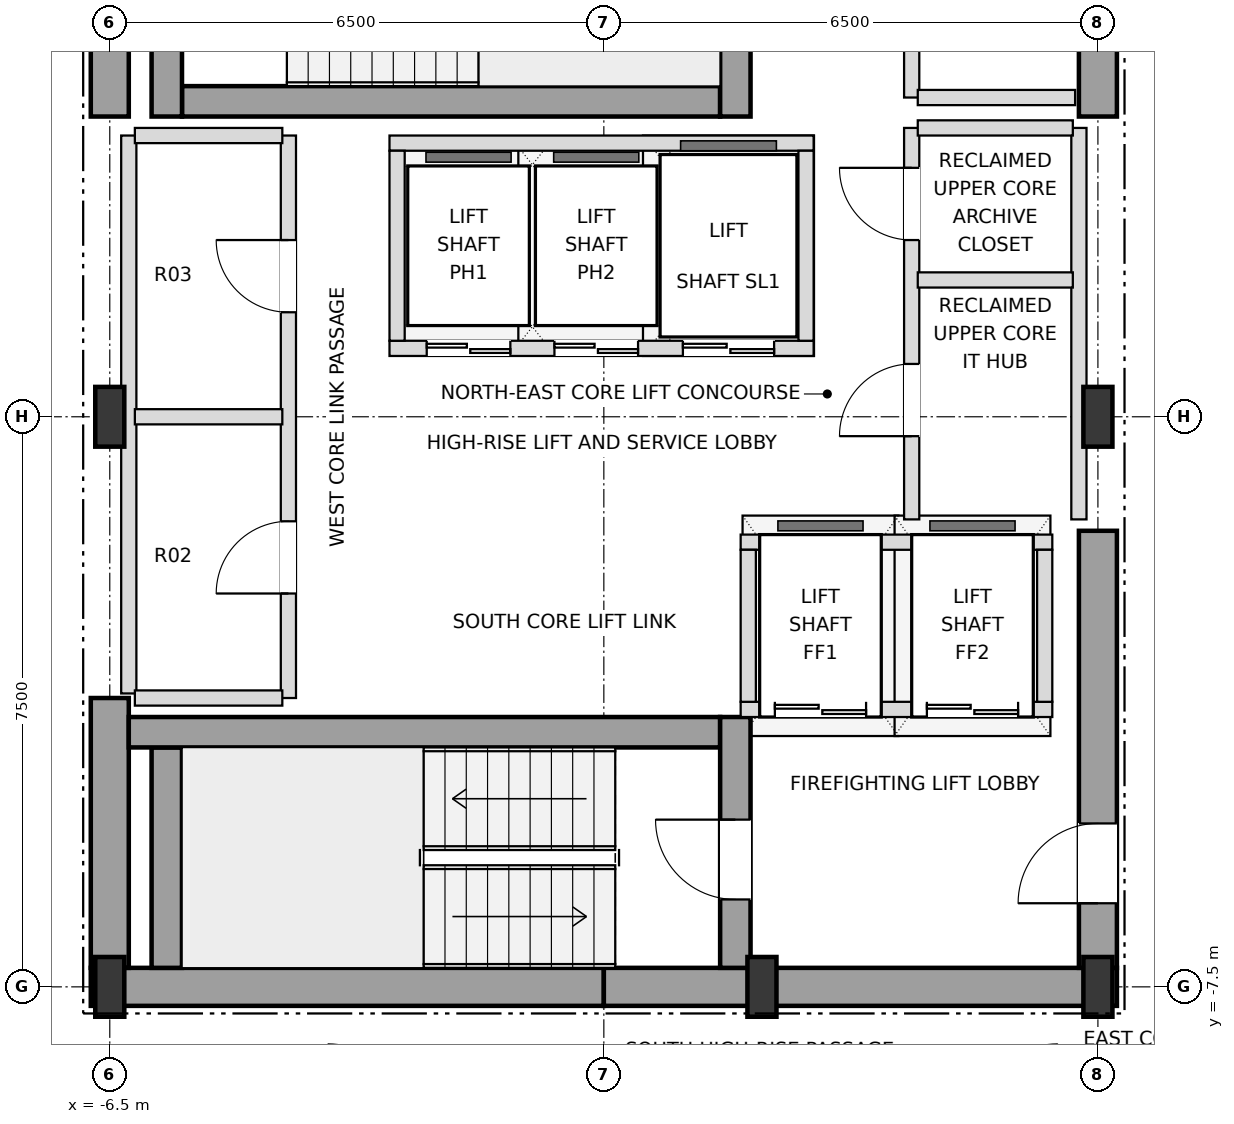
"""IFC4 building model, lengths in metres.
Left out: names, types, materials, properties, quantities, classifications, styles, units other than length and angle.
Written with IfcOpenShell. Run it as: python <this file> out.ifc"""

import sys

from ifc_helpers import new_model, si_unit, direction, frame, frame_2d, origin, origin_2d, place, context, subcontext, project, spatial, rectangle, i_section, extrude, element, fill, save


model = new_model("IFC4")
c1 = context("Model", 3, precision=1e-05, world=origin(), true_north=direction((0.0, 1.0)))
c2 = subcontext(c1, "Body", "Model", "MODEL_VIEW")
j1 = project(units=[si_unit("LENGTHUNIT", "METRE"), si_unit("PLANEANGLEUNIT", "RADIAN")], contexts=[c1])
p1 = place(None, origin())
s1 = spatial("IfcSite", under=j1, at=p1, CompositionType="ELEMENT")
p2 = place(p1, origin())
s2 = spatial("IfcBuilding", under=s1, at=p2, CompositionType="ELEMENT")
p3 = place(p2, frame((0.0, 0.0, 229.5)))
s3 = spatial("IfcBuildingStorey", under=s2, at=p3, CompositionType="ELEMENT", Elevation=229.5)
for number, where, z_axis, x_axis in (
    (1, (-6.5, -7.5, 0.0), (0.0, 0.0, 1.0), (1.0, 0.0, 0.0)),
    (2, (2.08, -7.5, 0.0), (0.0, 0.0, 1.0), (1.0, 0.0, 0.0)),
    (3, (6.5, -7.5, 0.0), (0.0, 0.0, 1.0), (1.0, 0.0, 0.0)),
    (4, (-6.5, 0.0, 0.0), (0.0, 0.0, 1.0), (1.0, 0.0, 0.0)),
    (5, (6.5, 0.0, 0.0), (0.0, 0.0, 1.0), (1.0, 0.0, 0.0)),
):
    element("IfcColumn", number, at=place(p3, frame(where, z_axis=z_axis, x_axis=x_axis)), inside=s3, PredefinedType="COLUMN", context=c2, shape_type="SweptSolid", body=[
        extrude(i_section(OverallWidth=0.382, OverallDepth=0.786, WebThickness=0.02, FlangeThickness=0.033, at=origin_2d()), origin(), (0.0, 0.0, 1.0), 3.6),
    ])
for number, where, z_axis, x_axis in (
    (6, (-6.75, -7.5, 0.0), (0.0, 0.0, 1.0), (1.0, 0.0, 0.0)),
    (7, (0.0, -7.5, 0.0), (0.0, 0.0, 1.0), (1.0, 0.0, 0.0)),
):
    element("IfcWall", number, at=place(p3, frame(where, z_axis=z_axis, x_axis=x_axis)), inside=s3, PredefinedType="SHEAR", context=c2, shape_type="SweptSolid", body=[
        extrude(rectangle(XDim=6.75, YDim=0.5, at=frame_2d((3.375, 0.0))), origin(), (0.0, 0.0, 1.0), 3.38),
    ])
p4 = place(p3, frame((-6.5, -7.25, 0.0), z_axis=(0.0, 0.0, 1.0), x_axis=(0.0, 1.0, 0.0)))
e8 = element("IfcWall", 8, at=p4, inside=s3, PredefinedType="SHEAR", context=c2, shape_type="SweptSolid", body=[
    extrude(rectangle(XDim=3.55, YDim=0.5, at=frame_2d((1.775, 0.0))), origin(), (0.0, 0.0, 1.0), 3.38),
])
p5 = place(p3, frame((-6.5, 3.95, 0.0), z_axis=(0.0, 0.0, 1.0), x_axis=(0.0, 1.0, 0.0)))
e9 = element("IfcWall", 9, at=p5, inside=s3, PredefinedType="SHEAR", context=c2, shape_type="SweptSolid", body=[
    extrude(rectangle(XDim=3.3, YDim=0.5, at=frame_2d((1.65, 0.0))), origin(), (0.0, 0.0, 1.0), 3.38),
])
p6 = place(p3, frame((6.5, -7.25, 0.0), z_axis=(0.0, 0.0, 1.0), x_axis=(0.0, 1.0, 0.0)))
e10 = element("IfcWall", 10, at=p6, inside=s3, PredefinedType="SHEAR", context=c2, shape_type="SweptSolid", body=[
    extrude(rectangle(XDim=5.75, YDim=0.5, at=frame_2d((2.875, 0.0))), origin(), (0.0, 0.0, 1.0), 3.38),
])
p7 = place(p6, frame((0.85, 0.0, 0.0)))
e11 = element("IfcOpeningElement", 11, at=p7, cuts=e10, PredefinedType="OPENING", context=c2, shape_type="SweptSolid", body=[
    extrude(rectangle(XDim=1.05, YDim=2.15, at=frame_2d((0.525, 1.075))), frame((0.0, 0.26, 0.0), z_axis=(0.0, -1.0, 0.0), x_axis=(1.0, 0.0, 0.0)), (0.0, 0.0, 1.0), 0.52),
])
p8 = place(p3, frame((6.5, 3.95, 0.0), z_axis=(0.0, 0.0, 1.0), x_axis=(0.0, 1.0, 0.0)))
e12 = element("IfcWall", 12, at=p8, inside=s3, PredefinedType="SHEAR", context=c2, shape_type="SweptSolid", body=[
    extrude(rectangle(XDim=3.3, YDim=0.5, at=frame_2d((1.65, 0.0))), origin(), (0.0, 0.0, 1.0), 3.38),
])
p9 = place(p3, frame((-5.75, -7.25, 0.0), z_axis=(0.0, 0.0, 1.0), x_axis=(0.0, 1.0, 0.0)))
e13 = element("IfcWall", 13, at=p9, inside=s3, PredefinedType="SHEAR", context=c2, shape_type="SweptSolid", body=[
    extrude(rectangle(XDim=2.9, YDim=0.4, at=frame_2d((1.45, 0.0))), origin(), (0.0, 0.0, 1.0), 3.38),
])
p10 = place(p3, frame((-6.25, -4.15, 0.0), z_axis=(0.0, 0.0, 1.0), x_axis=(1.0, 0.0, 0.0)))
e14 = element("IfcWall", 14, at=p10, inside=s3, PredefinedType="SHEAR", context=c2, shape_type="SweptSolid", body=[
    extrude(rectangle(XDim=7.78, YDim=0.4, at=frame_2d((3.89, 0.0))), origin(), (0.0, 0.0, 1.0), 3.38),
])
p11 = place(p3, frame((1.73, -7.25, 0.0), z_axis=(0.0, 0.0, 1.0), x_axis=(0.0, 1.0, 0.0)))
e15 = element("IfcWall", 15, at=p11, inside=s3, PredefinedType="SHEAR", context=c2, shape_type="SweptSolid", body=[
    extrude(rectangle(XDim=3.3, YDim=0.4, at=frame_2d((1.65, 0.0))), origin(), (0.0, 0.0, 1.0), 3.38),
])
p12 = place(p11, frame((0.9, 0.0, 0.0)))
e16 = element("IfcOpeningElement", 16, at=p12, cuts=e15, PredefinedType="OPENING", context=c2, shape_type="SweptSolid", body=[
    extrude(rectangle(XDim=1.05, YDim=2.15, at=frame_2d((0.525, 1.075))), frame((0.0, 0.21, 0.0), z_axis=(0.0, -1.0, 0.0), x_axis=(1.0, 0.0, 0.0)), (0.0, 0.0, 1.0), 0.42),
])
p13 = place(p3, frame((-5.55, 4.15, 0.0), z_axis=(0.0, 0.0, 1.0), x_axis=(1.0, 0.0, 0.0)))
e17 = element("IfcWall", 17, at=p13, inside=s3, PredefinedType="SHEAR", context=c2, shape_type="SweptSolid", body=[
    extrude(rectangle(XDim=7.08, YDim=0.4, at=frame_2d((3.54, 0.0))), origin(), (0.0, 0.0, 1.0), 3.38),
])
for number, where, z_axis, x_axis in (
    (18, (1.73, 3.95, 0.0), (0.0, 0.0, 1.0), (0.0, 1.0, 0.0)),
    (19, (-5.75, 3.95, 0.0), (0.0, 0.0, 1.0), (0.0, 1.0, 0.0)),
):
    element("IfcWall", number, at=place(p3, frame(where, z_axis=z_axis, x_axis=x_axis)), inside=s3, PredefinedType="SHEAR", context=c2, shape_type="SweptSolid", body=[
        extrude(rectangle(XDim=3.3, YDim=0.4, at=frame_2d((1.65, 0.0))), origin(), (0.0, 0.0, 1.0), 3.38),
    ])
p14 = place(p3, frame((-2.82, 0.9, 0.0), z_axis=(0.0, 0.0, 1.0), x_axis=(1.0, 0.0, 0.0)))
e20 = element("IfcWall", 20, at=p14, inside=s3, PredefinedType="SOLIDWALL", context=c2, shape_type="SweptSolid", body=[
    extrude(rectangle(XDim=5.58, YDim=0.2, at=frame_2d((2.79, 0.0))), origin(), (0.0, 0.0, 1.0), 3.38),
])
p15 = place(p14, frame((0.49, 0.0, 0.0)))
e21 = element("IfcOpeningElement", 21, at=p15, cuts=e20, PredefinedType="OPENING", context=c2, shape_type="SweptSolid", body=[
    extrude(rectangle(XDim=1.1, YDim=2.15, at=frame_2d((0.55, 1.075))), frame((0.0, 0.11, 0.0), z_axis=(0.0, -1.0, 0.0), x_axis=(1.0, 0.0, 0.0)), (0.0, 0.0, 1.0), 0.22),
])
p16 = place(p14, frame((2.17, 0.0, 0.0)))
e22 = element("IfcOpeningElement", 22, at=p16, cuts=e20, PredefinedType="OPENING", context=c2, shape_type="SweptSolid", body=[
    extrude(rectangle(XDim=1.1, YDim=2.15, at=frame_2d((0.55, 1.075))), frame((0.0, 0.11, 0.0), z_axis=(0.0, -1.0, 0.0), x_axis=(1.0, 0.0, 0.0)), (0.0, 0.0, 1.0), 0.22),
])
p17 = place(p14, frame((3.86, 0.0, 0.0)))
e23 = element("IfcOpeningElement", 23, at=p17, cuts=e20, PredefinedType="OPENING", context=c2, shape_type="SweptSolid", body=[
    extrude(rectangle(XDim=1.2, YDim=2.2, at=frame_2d((0.6, 1.1))), frame((0.0, 0.11, 0.0), z_axis=(0.0, -1.0, 0.0), x_axis=(1.0, 0.0, 0.0)), (0.0, 0.0, 1.0), 0.22),
])
p18 = place(p3, frame((-2.82, 3.6, 0.0), z_axis=(0.0, 0.0, 1.0), x_axis=(1.0, 0.0, 0.0)))
e24 = element("IfcWall", 24, at=p18, inside=s3, PredefinedType="SOLIDWALL", context=c2, shape_type="SweptSolid", body=[
    extrude(rectangle(XDim=5.58, YDim=0.2, at=frame_2d((2.79, 0.0))), origin(), (0.0, 0.0, 1.0), 3.38),
])
for number, where, z_axis, x_axis in (
    (25, (-2.72, 1.0, 0.0), (0.0, 0.0, 1.0), (0.0, 1.0, 0.0)),
    (26, (2.66, 1.0, 0.0), (0.0, 0.0, 1.0), (0.0, 1.0, 0.0)),
):
    element("IfcWall", number, at=place(p3, frame(where, z_axis=z_axis, x_axis=x_axis)), inside=s3, PredefinedType="SOLIDWALL", context=c2, shape_type="SweptSolid", body=[
        extrude(rectangle(XDim=2.5, YDim=0.2, at=frame_2d((1.25, 0.0))), origin(), (0.0, 0.0, 1.0), 3.38),
    ])
p19 = place(p3, frame((1.8, -3.85, 0.0), z_axis=(0.0, 0.0, 1.0), x_axis=(1.0, 0.0, 0.0)))
e27 = element("IfcWall", 27, at=p19, inside=s3, PredefinedType="SOLIDWALL", context=c2, shape_type="SweptSolid", body=[
    extrude(rectangle(XDim=4.1, YDim=0.2, at=frame_2d((2.05, 0.0))), origin(), (0.0, 0.0, 1.0), 3.38),
])
p20 = place(p19, frame((0.45, 0.0, 0.0)))
e28 = element("IfcOpeningElement", 28, at=p20, cuts=e27, PredefinedType="OPENING", context=c2, shape_type="SweptSolid", body=[
    extrude(rectangle(XDim=1.2, YDim=2.2, at=frame_2d((0.6, 1.1))), frame((0.0, 0.11, 0.0), z_axis=(0.0, -1.0, 0.0), x_axis=(1.0, 0.0, 0.0)), (0.0, 0.0, 1.0), 0.22),
])
p21 = place(p19, frame((2.45, 0.0, 0.0)))
e29 = element("IfcOpeningElement", 29, at=p21, cuts=e27, PredefinedType="OPENING", context=c2, shape_type="SweptSolid", body=[
    extrude(rectangle(XDim=1.2, YDim=2.2, at=frame_2d((0.6, 1.1))), frame((0.0, 0.11, 0.0), z_axis=(0.0, -1.0, 0.0), x_axis=(1.0, 0.0, 0.0)), (0.0, 0.0, 1.0), 0.22),
])
p22 = place(p3, frame((1.8, -1.65, 0.0), z_axis=(0.0, 0.0, 1.0), x_axis=(1.0, 0.0, 0.0)))
e30 = element("IfcWall", 30, at=p22, inside=s3, PredefinedType="SOLIDWALL", context=c2, shape_type="SweptSolid", body=[
    extrude(rectangle(XDim=4.1, YDim=0.2, at=frame_2d((2.05, 0.0))), origin(), (0.0, 0.0, 1.0), 3.38),
])
for number, where, z_axis, x_axis in (
    (31, (1.9, -3.75, 0.0), (0.0, 0.0, 1.0), (0.0, 1.0, 0.0)),
    (32, (5.8, -3.75, 0.0), (0.0, 0.0, 1.0), (0.0, 1.0, 0.0)),
):
    element("IfcWall", number, at=place(p3, frame(where, z_axis=z_axis, x_axis=x_axis)), inside=s3, PredefinedType="SOLIDWALL", context=c2, shape_type="SweptSolid", body=[
        extrude(rectangle(XDim=2.0, YDim=0.2, at=frame_2d((1.0, 0.0))), origin(), (0.0, 0.0, 1.0), 3.38),
    ])
p23 = place(p3, frame((-6.25, -3.64, 0.0), z_axis=(0.0, 0.0, 1.0), x_axis=(0.0, 1.0, 0.0)))
e33 = element("IfcWall", 33, at=p23, inside=s3, PredefinedType="SOLIDWALL", context=c2, shape_type="SweptSolid", body=[
    extrude(rectangle(XDim=7.34, YDim=0.2, at=frame_2d((3.67, 0.0))), origin(), (0.0, 0.0, 1.0), 3.38),
])
p24 = place(p3, frame((-4.15, -3.7, 0.0), z_axis=(0.0, 0.0, 1.0), x_axis=(0.0, 1.0, 0.0)))
e34 = element("IfcWall", 34, at=p24, inside=s3, PredefinedType="SOLIDWALL", context=c2, shape_type="SweptSolid", body=[
    extrude(rectangle(XDim=7.4, YDim=0.2, at=frame_2d((3.7, 0.0))), origin(), (0.0, 0.0, 1.0), 3.38),
])
p25 = place(p24, frame((1.375, 0.0, 0.0)))
e35 = element("IfcOpeningElement", 35, at=p25, cuts=e34, PredefinedType="OPENING", context=c2, shape_type="SweptSolid", body=[
    extrude(rectangle(XDim=0.95, YDim=2.15, at=frame_2d((0.475, 1.075))), frame((0.0, 0.11, 0.0), z_axis=(0.0, -1.0, 0.0), x_axis=(1.0, 0.0, 0.0)), (0.0, 0.0, 1.0), 0.22),
])
p26 = place(p24, frame((5.075, 0.0, 0.0)))
e36 = element("IfcOpeningElement", 36, at=p26, cuts=e34, PredefinedType="OPENING", context=c2, shape_type="SweptSolid", body=[
    extrude(rectangle(XDim=0.95, YDim=2.15, at=frame_2d((0.475, 1.075))), frame((0.0, 0.11, 0.0), z_axis=(0.0, -1.0, 0.0), x_axis=(1.0, 0.0, 0.0)), (0.0, 0.0, 1.0), 0.22),
])
p27 = place(p3, frame((4.05, -1.35, 0.0), z_axis=(0.0, 0.0, 1.0), x_axis=(0.0, 1.0, 0.0)))
e37 = element("IfcWall", 37, at=p27, inside=s3, PredefinedType="SOLIDWALL", context=c2, shape_type="SweptSolid", body=[
    extrude(rectangle(XDim=5.15, YDim=0.2, at=frame_2d((2.575, 0.0))), origin(), (0.0, 0.0, 1.0), 3.38),
])
p28 = place(p27, frame((1.095, 0.0, 0.0)))
e38 = element("IfcOpeningElement", 38, at=p28, cuts=e37, PredefinedType="OPENING", context=c2, shape_type="SweptSolid", body=[
    extrude(rectangle(XDim=0.95, YDim=2.15, at=frame_2d((0.475, 1.075))), frame((0.0, 0.11, 0.0), z_axis=(0.0, -1.0, 0.0), x_axis=(1.0, 0.0, 0.0)), (0.0, 0.0, 1.0), 0.22),
])
p29 = place(p27, frame((3.675, 0.0, 0.0)))
e39 = element("IfcOpeningElement", 39, at=p29, cuts=e37, PredefinedType="OPENING", context=c2, shape_type="SweptSolid", body=[
    extrude(rectangle(XDim=0.95, YDim=2.15, at=frame_2d((0.475, 1.075))), frame((0.0, 0.11, 0.0), z_axis=(0.0, -1.0, 0.0), x_axis=(1.0, 0.0, 0.0)), (0.0, 0.0, 1.0), 0.22),
])
p30 = place(p3, frame((4.05, 4.2, 0.0), z_axis=(0.0, 0.0, 1.0), x_axis=(0.0, 1.0, 0.0)))
e40 = element("IfcWall", 40, at=p30, inside=s3, PredefinedType="SOLIDWALL", context=c2, shape_type="SweptSolid", body=[
    extrude(rectangle(XDim=3.05, YDim=0.2, at=frame_2d((1.525, 0.0))), origin(), (0.0, 0.0, 1.0), 3.38),
])
p31 = place(p30, frame((0.975, 0.0, 0.0)))
e41 = element("IfcOpeningElement", 41, at=p31, cuts=e40, PredefinedType="OPENING", context=c2, shape_type="SweptSolid", body=[
    extrude(rectangle(XDim=0.95, YDim=2.15, at=frame_2d((0.475, 1.075))), frame((0.0, 0.11, 0.0), z_axis=(0.0, -1.0, 0.0), x_axis=(1.0, 0.0, 0.0)), (0.0, 0.0, 1.0), 0.22),
])
p32 = place(p3, frame((6.25, -1.35, 0.0), z_axis=(0.0, 0.0, 1.0), x_axis=(0.0, 1.0, 0.0)))
e42 = element("IfcWall", 42, at=p32, inside=s3, PredefinedType="SOLIDWALL", context=c2, shape_type="SweptSolid", body=[
    extrude(rectangle(XDim=5.15, YDim=0.2, at=frame_2d((2.575, 0.0))), origin(), (0.0, 0.0, 1.0), 3.38),
])
for number, where, z_axis, x_axis in (
    (43, (-6.17, -3.7, 0.0), (0.0, 0.0, 1.0), (1.0, 0.0, 0.0)),
    (44, (-6.17, 0.0, 0.0), (0.0, 0.0, 1.0), (1.0, 0.0, 0.0)),
):
    element("IfcWall", number, at=place(p3, frame(where, z_axis=z_axis, x_axis=x_axis)), inside=s3, PredefinedType="SOLIDWALL", context=c2, shape_type="SweptSolid", body=[
        extrude(rectangle(XDim=1.94, YDim=0.2, at=frame_2d((0.97, 0.0))), origin(), (0.0, 0.0, 1.0), 3.38),
    ])
p33 = place(p3, frame((4.13, 1.8, 0.0), z_axis=(0.0, 0.0, 1.0), x_axis=(1.0, 0.0, 0.0)))
e45 = element("IfcWall", 45, at=p33, inside=s3, PredefinedType="SOLIDWALL", context=c2, shape_type="SweptSolid", body=[
    extrude(rectangle(XDim=2.04, YDim=0.2, at=frame_2d((1.02, 0.0))), origin(), (0.0, 0.0, 1.0), 3.38),
])
p34 = place(p3, frame((-6.17, 3.7, 0.0), z_axis=(0.0, 0.0, 1.0), x_axis=(1.0, 0.0, 0.0)))
e46 = element("IfcWall", 46, at=p34, inside=s3, PredefinedType="SOLIDWALL", context=c2, shape_type="SweptSolid", body=[
    extrude(rectangle(XDim=1.94, YDim=0.2, at=frame_2d((0.97, 0.0))), origin(), (0.0, 0.0, 1.0), 3.38),
])
p35 = place(p3, frame((4.13, 3.8, 0.0), z_axis=(0.0, 0.0, 1.0), x_axis=(1.0, 0.0, 0.0)))
e47 = element("IfcWall", 47, at=p35, inside=s3, PredefinedType="SOLIDWALL", context=c2, shape_type="SweptSolid", body=[
    extrude(rectangle(XDim=2.04, YDim=0.2, at=frame_2d((1.02, 0.0))), origin(), (0.0, 0.0, 1.0), 3.38),
])
p36 = place(p3, frame((4.13, 4.2, 0.0), z_axis=(0.0, 0.0, 1.0), x_axis=(1.0, 0.0, 0.0)))
e48 = element("IfcWall", 48, at=p36, inside=s3, PredefinedType="SOLIDWALL", context=c2, shape_type="SweptSolid", body=[
    extrude(rectangle(XDim=2.07, YDim=0.2, at=frame_2d((1.035, 0.0))), origin(), (0.0, 0.0, 1.0), 3.38),
])
p37 = place(p7, origin())
e49 = element("IfcDoor", 49, at=p37, inside=s3, OperationType="SINGLE_SWING_LEFT", PredefinedType="DOOR", context=c2, shape_type="SweptSolid", body=[
    extrude(rectangle(XDim=1.05, YDim=2.15, at=frame_2d((0.525, 1.075))), frame((0.0, 0.025, 0.0), z_axis=(0.0, -1.0, 0.0), x_axis=(1.0, 0.0, 0.0)), (0.0, 0.0, 1.0), 0.05),
])
fill(e11, e49)
p38 = place(p12, origin())
e50 = element("IfcDoor", 50, at=p38, inside=s3, OperationType="SINGLE_SWING_RIGHT", PredefinedType="DOOR", context=c2, shape_type="SweptSolid", body=[
    extrude(rectangle(XDim=1.05, YDim=2.15, at=frame_2d((0.525, 1.075))), frame((0.0, 0.025, 0.0), z_axis=(0.0, -1.0, 0.0), x_axis=(1.0, 0.0, 0.0)), (0.0, 0.0, 1.0), 0.05),
])
fill(e16, e50)
p39 = place(p15, origin())
e51 = element("IfcDoor", 51, at=p39, inside=s3, OperationType="DOUBLE_DOOR_SLIDING", PredefinedType="DOOR", context=c2, shape_type="SweptSolid", body=[
    extrude(rectangle(XDim=1.1, YDim=2.15, at=frame_2d((0.55, 1.075))), frame((0.0, 0.025, 0.0), z_axis=(0.0, -1.0, 0.0), x_axis=(1.0, 0.0, 0.0)), (0.0, 0.0, 1.0), 0.05),
])
fill(e21, e51)
p40 = place(p16, origin())
e52 = element("IfcDoor", 52, at=p40, inside=s3, OperationType="DOUBLE_DOOR_SLIDING", PredefinedType="DOOR", context=c2, shape_type="SweptSolid", body=[
    extrude(rectangle(XDim=1.1, YDim=2.15, at=frame_2d((0.55, 1.075))), frame((0.0, 0.025, 0.0), z_axis=(0.0, -1.0, 0.0), x_axis=(1.0, 0.0, 0.0)), (0.0, 0.0, 1.0), 0.05),
])
fill(e22, e52)
p41 = place(p17, origin())
e53 = element("IfcDoor", 53, at=p41, inside=s3, OperationType="DOUBLE_DOOR_SLIDING", PredefinedType="DOOR", context=c2, shape_type="SweptSolid", body=[
    extrude(rectangle(XDim=1.2, YDim=2.2, at=frame_2d((0.6, 1.1))), frame((0.0, 0.025, 0.0), z_axis=(0.0, -1.0, 0.0), x_axis=(1.0, 0.0, 0.0)), (0.0, 0.0, 1.0), 0.05),
])
fill(e23, e53)
p42 = place(p20, origin())
e54 = element("IfcDoor", 54, at=p42, inside=s3, OperationType="DOUBLE_DOOR_SLIDING", PredefinedType="DOOR", context=c2, shape_type="SweptSolid", body=[
    extrude(rectangle(XDim=1.2, YDim=2.2, at=frame_2d((0.6, 1.1))), frame((0.0, 0.025, 0.0), z_axis=(0.0, -1.0, 0.0), x_axis=(1.0, 0.0, 0.0)), (0.0, 0.0, 1.0), 0.05),
])
fill(e28, e54)
p43 = place(p21, origin())
e55 = element("IfcDoor", 55, at=p43, inside=s3, OperationType="DOUBLE_DOOR_SLIDING", PredefinedType="DOOR", context=c2, shape_type="SweptSolid", body=[
    extrude(rectangle(XDim=1.2, YDim=2.2, at=frame_2d((0.6, 1.1))), frame((0.0, 0.025, 0.0), z_axis=(0.0, -1.0, 0.0), x_axis=(1.0, 0.0, 0.0)), (0.0, 0.0, 1.0), 0.05),
])
fill(e29, e55)
p44 = place(p25, origin())
e56 = element("IfcDoor", 56, at=p44, inside=s3, OperationType="SINGLE_SWING_LEFT", PredefinedType="DOOR", context=c2, shape_type="SweptSolid", body=[
    extrude(rectangle(XDim=0.95, YDim=2.15, at=frame_2d((0.475, 1.075))), frame((0.0, 0.025, 0.0), z_axis=(0.0, -1.0, 0.0), x_axis=(1.0, 0.0, 0.0)), (0.0, 0.0, 1.0), 0.05),
])
fill(e35, e56)
p45 = place(p26, origin())
e57 = element("IfcDoor", 57, at=p45, inside=s3, OperationType="SINGLE_SWING_RIGHT", PredefinedType="DOOR", context=c2, shape_type="SweptSolid", body=[
    extrude(rectangle(XDim=0.95, YDim=2.15, at=frame_2d((0.475, 1.075))), frame((0.0, 0.025, 0.0), z_axis=(0.0, -1.0, 0.0), x_axis=(1.0, 0.0, 0.0)), (0.0, 0.0, 1.0), 0.05),
])
fill(e36, e57)
p46 = place(p28, origin())
e58 = element("IfcDoor", 58, at=p46, inside=s3, OperationType="SINGLE_SWING_LEFT", PredefinedType="DOOR", context=c2, shape_type="SweptSolid", body=[
    extrude(rectangle(XDim=0.95, YDim=2.15, at=frame_2d((0.475, 1.075))), frame((0.0, 0.025, 0.0), z_axis=(0.0, -1.0, 0.0), x_axis=(1.0, 0.0, 0.0)), (0.0, 0.0, 1.0), 0.05),
])
fill(e38, e58)
p47 = place(p29, origin())
e59 = element("IfcDoor", 59, at=p47, inside=s3, OperationType="SINGLE_SWING_RIGHT", PredefinedType="DOOR", context=c2, shape_type="SweptSolid", body=[
    extrude(rectangle(XDim=0.95, YDim=2.15, at=frame_2d((0.475, 1.075))), frame((0.0, 0.025, 0.0), z_axis=(0.0, -1.0, 0.0), x_axis=(1.0, 0.0, 0.0)), (0.0, 0.0, 1.0), 0.05),
])
fill(e39, e59)
save(model, sys.argv[1])
